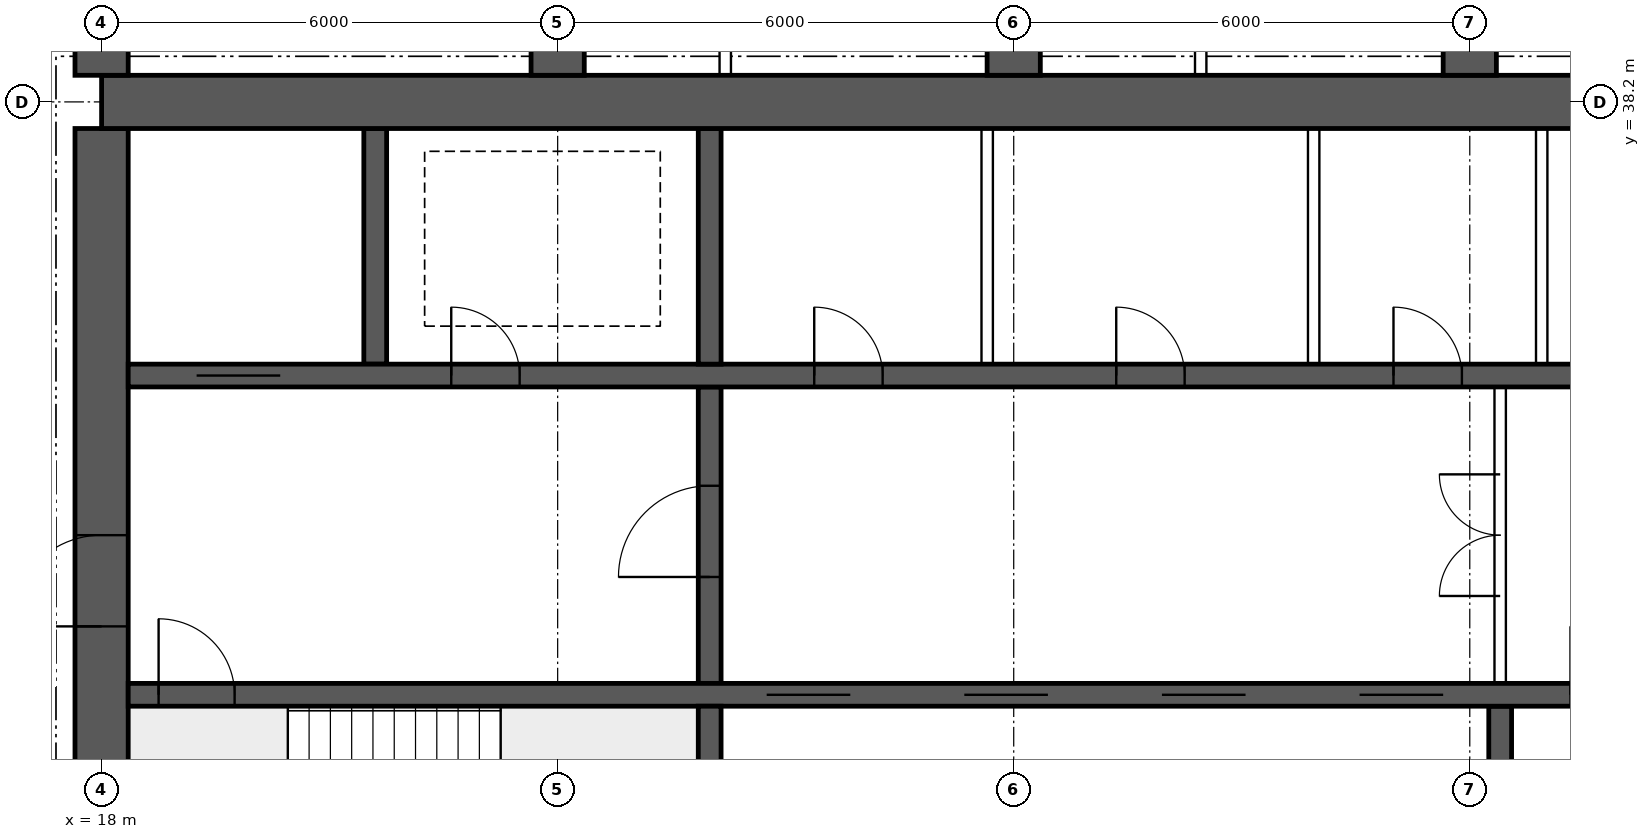
"""IFC4 building model, lengths in metres.
Left out: names, types, materials, properties, quantities, classifications, styles, units other than length and angle.
Written with IfcOpenShell. Run it as: python <this file> out.ifc"""

import sys

from ifc_helpers import new_model, si_unit, direction, frame, frame_2d, origin, place, context, subcontext, project, spatial, rectangle, extrude, element, fill, save


model = new_model("IFC4")
c1 = context("Model", 3, precision=1e-05, world=origin(), true_north=direction((0.0, 1.0)))
c2 = subcontext(c1, "Body", "Model", "MODEL_VIEW")
j1 = project(units=[si_unit("LENGTHUNIT", "METRE"), si_unit("PLANEANGLEUNIT", "RADIAN")], contexts=[c1])
p1 = place(None, origin())
s1 = spatial("IfcSite", under=j1, at=p1, CompositionType="ELEMENT")
p2 = place(p1, origin())
s2 = spatial("IfcBuilding", under=s1, at=p2, CompositionType="ELEMENT")
p3 = place(p2, frame((0.0, 0.0, 212.8)))
s3 = spatial("IfcBuildingStorey", under=s2, at=p3, CompositionType="ELEMENT", Elevation=212.8)
p4 = place(p3, frame((18.0, 38.2, 0.0), z_axis=(0.0, 0.0, 1.0), x_axis=(1.0, 0.0, 0.0)))
e1 = element("IfcWall", 1, at=p4, inside=s3, PredefinedType="SHEAR", context=c2, shape_type="SweptSolid", body=[
    extrude(rectangle(XDim=48.0, YDim=0.7, at=frame_2d((24.0, 0.0))), origin(), (0.0, 0.0, 1.0), 3.75),
])
p5 = place(p3, frame((18.0, 26.15, 0.0), z_axis=(0.0, 0.0, 1.0), x_axis=(0.0, 1.0, 0.0)))
e2 = element("IfcWall", 2, at=p5, inside=s3, PredefinedType="SHEAR", context=c2, shape_type="SweptSolid", body=[
    extrude(rectangle(XDim=11.7, YDim=0.7, at=frame_2d((5.85, 0.0))), origin(), (0.0, 0.0, 1.0), 3.75),
])
p6 = place(p5, frame((5.15, 0.0, 0.0)))
e3 = element("IfcOpeningElement", 3, at=p6, cuts=e2, PredefinedType="OPENING", context=c2, shape_type="SweptSolid", body=[
    extrude(rectangle(XDim=1.2, YDim=2.1, at=frame_2d((0.6, 1.05))), frame((0.0, 0.36, 0.0), z_axis=(0.0, -1.0, 0.0), x_axis=(1.0, 0.0, 0.0)), (0.0, 0.0, 1.0), 0.72),
])
p7 = place(p3, frame((18.35, 30.4, 0.0), z_axis=(0.0, 0.0, 1.0), x_axis=(1.0, 0.0, 0.0)))
e4 = element("IfcWall", 4, at=p7, inside=s3, PredefinedType="SHEAR", context=c2, shape_type="SweptSolid", body=[
    extrude(rectangle(XDim=47.3, YDim=0.3, at=frame_2d((23.65, 0.0))), origin(), (0.0, 0.0, 1.0), 3.75),
])
p8 = place(p7, frame((0.4, 0.0, 0.0)))
e5 = element("IfcOpeningElement", 5, at=p8, cuts=e4, PredefinedType="OPENING", context=c2, shape_type="SweptSolid", body=[
    extrude(rectangle(XDim=1.0, YDim=2.1, at=frame_2d((0.5, 1.05))), frame((0.0, 0.16, 0.0), z_axis=(0.0, -1.0, 0.0), x_axis=(1.0, 0.0, 0.0)), (0.0, 0.0, 1.0), 0.32),
])
p9 = place(p7, frame((45.9, 0.0, 0.0)))
e6 = element("IfcOpeningElement", 6, at=p9, cuts=e4, PredefinedType="OPENING", context=c2, shape_type="SweptSolid", body=[
    extrude(rectangle(XDim=1.0, YDim=2.1, at=frame_2d((0.5, 1.05))), frame((0.0, 0.16, 0.0), z_axis=(0.0, -1.0, 0.0), x_axis=(1.0, 0.0, 0.0)), (0.0, 0.0, 1.0), 0.32),
])
p10 = place(p7, frame((8.4, 0.0, 0.0)))
e7 = element("IfcOpeningElement", 7, at=p10, cuts=e4, PredefinedType="OPENING", context=c2, shape_type="SweptSolid", body=[
    extrude(rectangle(XDim=1.1, YDim=2.1, at=frame_2d((0.55, 1.05))), frame((0.0, 0.16, 0.0), z_axis=(0.0, -1.0, 0.0), x_axis=(1.0, 0.0, 0.0)), (0.0, 0.0, 1.0), 0.32),
])
p11 = place(p7, frame((11.0, 0.0, 0.0)))
e8 = element("IfcOpeningElement", 8, at=p11, cuts=e4, PredefinedType="OPENING", context=c2, shape_type="SweptSolid", body=[
    extrude(rectangle(XDim=1.1, YDim=2.1, at=frame_2d((0.55, 1.05))), frame((0.0, 0.16, 0.0), z_axis=(0.0, -1.0, 0.0), x_axis=(1.0, 0.0, 0.0)), (0.0, 0.0, 1.0), 0.32),
])
p12 = place(p7, frame((13.6, 0.0, 0.0)))
e9 = element("IfcOpeningElement", 9, at=p12, cuts=e4, PredefinedType="OPENING", context=c2, shape_type="SweptSolid", body=[
    extrude(rectangle(XDim=1.1, YDim=2.1, at=frame_2d((0.55, 1.05))), frame((0.0, 0.16, 0.0), z_axis=(0.0, -1.0, 0.0), x_axis=(1.0, 0.0, 0.0)), (0.0, 0.0, 1.0), 0.32),
])
p13 = place(p7, frame((16.2, 0.0, 0.0)))
e10 = element("IfcOpeningElement", 10, at=p13, cuts=e4, PredefinedType="OPENING", context=c2, shape_type="SweptSolid", body=[
    extrude(rectangle(XDim=1.1, YDim=2.1, at=frame_2d((0.55, 1.05))), frame((0.0, 0.16, 0.0), z_axis=(0.0, -1.0, 0.0), x_axis=(1.0, 0.0, 0.0)), (0.0, 0.0, 1.0), 0.32),
])
p14 = place(p7, frame((18.975, 0.0, 0.0)))
e11 = element("IfcOpeningElement", 11, at=p14, cuts=e4, PredefinedType="OPENING", context=c2, shape_type="SweptSolid", body=[
    extrude(rectangle(XDim=0.9, YDim=2.1, at=frame_2d((0.45, 1.05))), frame((0.0, 0.16, 0.0), z_axis=(0.0, -1.0, 0.0), x_axis=(1.0, 0.0, 0.0)), (0.0, 0.0, 1.0), 0.32),
])
p15 = place(p7, frame((30.267, 0.0, 0.0)))
e12 = element("IfcOpeningElement", 12, at=p15, cuts=e4, PredefinedType="OPENING", context=c2, shape_type="SweptSolid", body=[
    extrude(rectangle(XDim=1.1, YDim=2.1, at=frame_2d((0.55, 1.05))), frame((0.0, 0.16, 0.0), z_axis=(0.0, -1.0, 0.0), x_axis=(1.0, 0.0, 0.0)), (0.0, 0.0, 1.0), 0.32),
])
p16 = place(p7, frame((33.8, 0.0, 0.0)))
e13 = element("IfcOpeningElement", 13, at=p16, cuts=e4, PredefinedType="OPENING", context=c2, shape_type="SweptSolid", body=[
    extrude(rectangle(XDim=1.1, YDim=2.1, at=frame_2d((0.55, 1.05))), frame((0.0, 0.16, 0.0), z_axis=(0.0, -1.0, 0.0), x_axis=(1.0, 0.0, 0.0)), (0.0, 0.0, 1.0), 0.32),
])
p17 = place(p7, frame((37.333, 0.0, 0.0)))
e14 = element("IfcOpeningElement", 14, at=p17, cuts=e4, PredefinedType="OPENING", context=c2, shape_type="SweptSolid", body=[
    extrude(rectangle(XDim=1.1, YDim=2.1, at=frame_2d((0.55, 1.05))), frame((0.0, 0.16, 0.0), z_axis=(0.0, -1.0, 0.0), x_axis=(1.0, 0.0, 0.0)), (0.0, 0.0, 1.0), 0.32),
])
p18 = place(p3, frame((18.35, 34.6, 0.0), z_axis=(0.0, 0.0, 1.0), x_axis=(1.0, 0.0, 0.0)))
e15 = element("IfcWall", 15, at=p18, inside=s3, PredefinedType="SHEAR", context=c2, shape_type="SweptSolid", body=[
    extrude(rectangle(XDim=47.3, YDim=0.3, at=frame_2d((23.65, 0.0))), origin(), (0.0, 0.0, 1.0), 3.75),
])
p19 = place(p18, frame((0.9, 0.0, 0.0)))
e16 = element("IfcOpeningElement", 16, at=p19, cuts=e15, PredefinedType="OPENING", context=c2, shape_type="SweptSolid", body=[
    extrude(rectangle(XDim=1.1, YDim=2.1, at=frame_2d((0.55, 1.05))), frame((0.0, 0.16, 0.0), z_axis=(0.0, -1.0, 0.0), x_axis=(1.0, 0.0, 0.0)), (0.0, 0.0, 1.0), 0.32),
])
p20 = place(p18, frame((45.3, 0.0, 0.0)))
e17 = element("IfcOpeningElement", 17, at=p20, cuts=e15, PredefinedType="OPENING", context=c2, shape_type="SweptSolid", body=[
    extrude(rectangle(XDim=1.1, YDim=2.1, at=frame_2d((0.55, 1.05))), frame((0.0, 0.16, 0.0), z_axis=(0.0, -1.0, 0.0), x_axis=(1.0, 0.0, 0.0)), (0.0, 0.0, 1.0), 0.32),
])
p21 = place(p18, frame((4.25, 0.0, 0.0)))
e18 = element("IfcOpeningElement", 18, at=p21, cuts=e15, PredefinedType="OPENING", context=c2, shape_type="SweptSolid", body=[
    extrude(rectangle(XDim=0.9, YDim=2.1, at=frame_2d((0.45, 1.05))), frame((0.0, 0.16, 0.0), z_axis=(0.0, -1.0, 0.0), x_axis=(1.0, 0.0, 0.0)), (0.0, 0.0, 1.0), 0.32),
])
p22 = place(p18, frame((42.15, 0.0, 0.0)))
e19 = element("IfcOpeningElement", 19, at=p22, cuts=e15, PredefinedType="OPENING", context=c2, shape_type="SweptSolid", body=[
    extrude(rectangle(XDim=0.9, YDim=2.1, at=frame_2d((0.45, 1.05))), frame((0.0, 0.16, 0.0), z_axis=(0.0, -1.0, 0.0), x_axis=(1.0, 0.0, 0.0)), (0.0, 0.0, 1.0), 0.32),
])
p23 = place(p18, frame((9.025, 0.0, 0.0)))
e20 = element("IfcOpeningElement", 20, at=p23, cuts=e15, PredefinedType="OPENING", context=c2, shape_type="SweptSolid", body=[
    extrude(rectangle(XDim=0.9, YDim=2.1, at=frame_2d((0.45, 1.05))), frame((0.0, 0.16, 0.0), z_axis=(0.0, -1.0, 0.0), x_axis=(1.0, 0.0, 0.0)), (0.0, 0.0, 1.0), 0.32),
])
p24 = place(p18, frame((12.999, 0.0, 0.0)))
e21 = element("IfcOpeningElement", 21, at=p24, cuts=e15, PredefinedType="OPENING", context=c2, shape_type="SweptSolid", body=[
    extrude(rectangle(XDim=0.9, YDim=2.1, at=frame_2d((0.45, 1.05))), frame((0.0, 0.16, 0.0), z_axis=(0.0, -1.0, 0.0), x_axis=(1.0, 0.0, 0.0)), (0.0, 0.0, 1.0), 0.32),
])
p25 = place(p18, frame((16.646, 0.0, 0.0)))
e22 = element("IfcOpeningElement", 22, at=p25, cuts=e15, PredefinedType="OPENING", context=c2, shape_type="SweptSolid", body=[
    extrude(rectangle(XDim=0.9, YDim=2.1, at=frame_2d((0.45, 1.05))), frame((0.0, 0.16, 0.0), z_axis=(0.0, -1.0, 0.0), x_axis=(1.0, 0.0, 0.0)), (0.0, 0.0, 1.0), 0.32),
])
p26 = place(p18, frame((20.405, 0.0, 0.0)))
e23 = element("IfcOpeningElement", 23, at=p26, cuts=e15, PredefinedType="OPENING", context=c2, shape_type="SweptSolid", body=[
    extrude(rectangle(XDim=0.9, YDim=2.1, at=frame_2d((0.45, 1.05))), frame((0.0, 0.16, 0.0), z_axis=(0.0, -1.0, 0.0), x_axis=(1.0, 0.0, 0.0)), (0.0, 0.0, 1.0), 0.32),
])
p27 = place(p18, frame((24.811, 0.0, 0.0)))
e24 = element("IfcOpeningElement", 24, at=p27, cuts=e15, PredefinedType="OPENING", context=c2, shape_type="SweptSolid", body=[
    extrude(rectangle(XDim=0.9, YDim=2.1, at=frame_2d((0.45, 1.05))), frame((0.0, 0.16, 0.0), z_axis=(0.0, -1.0, 0.0), x_axis=(1.0, 0.0, 0.0)), (0.0, 0.0, 1.0), 0.32),
])
p28 = place(p18, frame((27.608, 0.0, 0.0)))
e25 = element("IfcOpeningElement", 25, at=p28, cuts=e15, PredefinedType="OPENING", context=c2, shape_type="SweptSolid", body=[
    extrude(rectangle(XDim=0.9, YDim=2.1, at=frame_2d((0.45, 1.05))), frame((0.0, 0.16, 0.0), z_axis=(0.0, -1.0, 0.0), x_axis=(1.0, 0.0, 0.0)), (0.0, 0.0, 1.0), 0.32),
])
p29 = place(p18, frame((29.981, 0.0, 0.0)))
e26 = element("IfcOpeningElement", 26, at=p29, cuts=e15, PredefinedType="OPENING", context=c2, shape_type="SweptSolid", body=[
    extrude(rectangle(XDim=0.9, YDim=2.1, at=frame_2d((0.45, 1.05))), frame((0.0, 0.16, 0.0), z_axis=(0.0, -1.0, 0.0), x_axis=(1.0, 0.0, 0.0)), (0.0, 0.0, 1.0), 0.32),
])
p30 = place(p18, frame((33.831, 0.0, 0.0)))
e27 = element("IfcOpeningElement", 27, at=p30, cuts=e15, PredefinedType="OPENING", context=c2, shape_type="SweptSolid", body=[
    extrude(rectangle(XDim=0.9, YDim=2.1, at=frame_2d((0.45, 1.05))), frame((0.0, 0.16, 0.0), z_axis=(0.0, -1.0, 0.0), x_axis=(1.0, 0.0, 0.0)), (0.0, 0.0, 1.0), 0.32),
])
p31 = place(p18, frame((37.579, 0.0, 0.0)))
e28 = element("IfcOpeningElement", 28, at=p31, cuts=e15, PredefinedType="OPENING", context=c2, shape_type="SweptSolid", body=[
    extrude(rectangle(XDim=0.9, YDim=2.1, at=frame_2d((0.45, 1.05))), frame((0.0, 0.16, 0.0), z_axis=(0.0, -1.0, 0.0), x_axis=(1.0, 0.0, 0.0)), (0.0, 0.0, 1.0), 0.32),
])
p32 = place(p3, frame((26.0, 26.15, 0.0), z_axis=(0.0, 0.0, 1.0), x_axis=(0.0, 1.0, 0.0)))
e29 = element("IfcWall", 29, at=p32, inside=s3, PredefinedType="SHEAR", context=c2, shape_type="SweptSolid", body=[
    extrude(rectangle(XDim=4.1, YDim=0.3, at=frame_2d((2.05, 0.0))), origin(), (0.0, 0.0, 1.0), 3.75),
])
p33 = place(p3, frame((26.0, 30.55, 0.0), z_axis=(0.0, 0.0, 1.0), x_axis=(0.0, 1.0, 0.0)))
e30 = element("IfcWall", 30, at=p33, inside=s3, PredefinedType="SHEAR", context=c2, shape_type="SweptSolid", body=[
    extrude(rectangle(XDim=3.9, YDim=0.3, at=frame_2d((1.95, 0.0))), origin(), (0.0, 0.0, 1.0), 3.75),
])
p34 = place(p33, frame((1.4, 0.0, 0.0)))
e31 = element("IfcOpeningElement", 31, at=p34, cuts=e30, PredefinedType="OPENING", context=c2, shape_type="SweptSolid", body=[
    extrude(rectangle(XDim=1.2, YDim=2.1, at=frame_2d((0.6, 1.05))), frame((0.0, 0.16, 0.0), z_axis=(0.0, -1.0, 0.0), x_axis=(1.0, 0.0, 0.0)), (0.0, 0.0, 1.0), 0.32),
])
for number, where, z_axis, x_axis in (
    (32, (21.6, 34.75, 0.0), (0.0, 0.0, 1.0), (0.0, 1.0, 0.0)),
    (33, (26.0, 34.75, 0.0), (0.0, 0.0, 1.0), (0.0, 1.0, 0.0)),
):
    element("IfcWall", number, at=place(p3, frame(where, z_axis=z_axis, x_axis=x_axis)), inside=s3, PredefinedType="SHEAR", context=c2, shape_type="SweptSolid", body=[
        extrude(rectangle(XDim=3.1, YDim=0.3, at=frame_2d((1.55, 0.0))), origin(), (0.0, 0.0, 1.0), 3.75),
    ])
p35 = place(p3, frame((36.4, 26.15, 0.0), z_axis=(0.0, 0.0, 1.0), x_axis=(0.0, 1.0, 0.0)))
e34 = element("IfcWall", 34, at=p35, inside=s3, PredefinedType="SHEAR", context=c2, shape_type="SweptSolid", body=[
    extrude(rectangle(XDim=4.1, YDim=0.3, at=frame_2d((2.05, 0.0))), origin(), (0.0, 0.0, 1.0), 3.75),
])
for number, where, z_axis, x_axis in (
    (35, (18.0, 38.55, 0.0), (0.0, 0.0, 1.0), (0.0, 1.0, 0.0)),
    (36, (24.0, 38.55, 0.0), (0.0, 0.0, 1.0), (0.0, 1.0, 0.0)),
    (37, (30.0, 38.55, 0.0), (0.0, 0.0, 1.0), (0.0, 1.0, 0.0)),
    (38, (36.0, 38.55, 0.0), (0.0, 0.0, 1.0), (0.0, 1.0, 0.0)),
):
    element("IfcWall", number, at=place(p3, frame(where, z_axis=z_axis, x_axis=x_axis)), inside=s3, PredefinedType="SHEAR", context=c2, shape_type="SweptSolid", body=[
        extrude(rectangle(XDim=7.05, YDim=0.7, at=frame_2d((3.525, 0.0))), origin(), (0.0, 0.0, 1.0), 3.75),
    ])
p36 = place(p3, frame((36.4, 30.55, 0.0), z_axis=(0.0, 0.0, 1.0), x_axis=(0.0, 1.0, 0.0)))
e39 = element("IfcWall", 39, at=p36, inside=s3, PredefinedType="SOLIDWALL", context=c2, shape_type="SweptSolid", body=[
    extrude(rectangle(XDim=3.9, YDim=0.15, at=frame_2d((1.95, 0.0))), origin(), (0.0, 0.0, 1.0), 3.3),
])
p37 = place(p36, frame((1.15, 0.0, 0.0)))
e40 = element("IfcOpeningElement", 40, at=p37, cuts=e39, PredefinedType="OPENING", context=c2, shape_type="SweptSolid", body=[
    extrude(rectangle(XDim=1.6, YDim=2.1, at=frame_2d((0.8, 1.05))), frame((0.0, 0.085, 0.0), z_axis=(0.0, -1.0, 0.0), x_axis=(1.0, 0.0, 0.0)), (0.0, 0.0, 1.0), 0.17),
])
for number, where, z_axis, x_axis in (
    (41, (29.651, 34.75, 0.0), (0.0, 0.0, 1.0), (0.0, 1.0, 0.0)),
    (42, (33.946, 34.75, 0.0), (0.0, 0.0, 1.0), (0.0, 1.0, 0.0)),
    (43, (36.946, 34.75, 0.0), (0.0, 0.0, 1.0), (0.0, 1.0, 0.0)),
):
    element("IfcWall", number, at=place(p3, frame(where, z_axis=z_axis, x_axis=x_axis)), inside=s3, PredefinedType="SOLIDWALL", context=c2, shape_type="SweptSolid", body=[
        extrude(rectangle(XDim=3.1, YDim=0.15, at=frame_2d((1.55, 0.0))), origin(), (0.0, 0.0, 1.0), 3.3),
    ])
for number, where, z_axis, x_axis in (
    (44, (26.205, 38.55, 0.0), (0.0, 0.0, 1.0), (0.0, 1.0, 0.0)),
    (45, (32.46, 38.55, 0.0), (0.0, 0.0, 1.0), (0.0, 1.0, 0.0)),
):
    element("IfcWall", number, at=place(p3, frame(where, z_axis=z_axis, x_axis=x_axis)), inside=s3, PredefinedType="PARTITIONING", context=c2, shape_type="SweptSolid", body=[
        extrude(rectangle(XDim=6.95, YDim=0.15, at=frame_2d((3.475, 0.0))), origin(), (0.0, 0.0, 1.0), 3.3),
    ])
p38 = place(p37, origin())
e46 = element("IfcDoor", 46, at=p38, inside=s3, OperationType="DOUBLE_DOOR_SINGLE_SWING", PredefinedType="DOOR", context=c2, shape_type="SweptSolid", body=[
    extrude(rectangle(XDim=1.6, YDim=2.1, at=frame_2d((0.8, 1.05))), frame((0.0, 0.025, 0.0), z_axis=(0.0, -1.0, 0.0), x_axis=(1.0, 0.0, 0.0)), (0.0, 0.0, 1.0), 0.05),
])
fill(e40, e46)
p39 = place(p6, origin())
e47 = element("IfcDoor", 47, at=p39, inside=s3, OperationType="SINGLE_SWING_LEFT", PredefinedType="DOOR", context=c2, shape_type="SweptSolid", body=[
    extrude(rectangle(XDim=1.2, YDim=2.1, at=frame_2d((0.6, 1.05))), frame((0.0, 0.025, 0.0), z_axis=(0.0, -1.0, 0.0), x_axis=(1.0, 0.0, 0.0)), (0.0, 0.0, 1.0), 0.05),
])
fill(e3, e47)
p40 = place(p8, origin())
e48 = element("IfcDoor", 48, at=p40, inside=s3, OperationType="SINGLE_SWING_LEFT", PredefinedType="DOOR", context=c2, shape_type="SweptSolid", body=[
    extrude(rectangle(XDim=1.0, YDim=2.1, at=frame_2d((0.5, 1.05))), frame((0.0, 0.025, 0.0), z_axis=(0.0, -1.0, 0.0), x_axis=(1.0, 0.0, 0.0)), (0.0, 0.0, 1.0), 0.05),
])
fill(e5, e48)
p41 = place(p19, origin())
e49 = element("IfcDoor", 49, at=p41, inside=s3, OperationType="DOUBLE_DOOR_SLIDING", PredefinedType="DOOR", context=c2, shape_type="SweptSolid", body=[
    extrude(rectangle(XDim=1.1, YDim=2.1, at=frame_2d((0.55, 1.05))), frame((0.0, 0.025, 0.0), z_axis=(0.0, -1.0, 0.0), x_axis=(1.0, 0.0, 0.0)), (0.0, 0.0, 1.0), 0.05),
])
fill(e16, e49)
p42 = place(p21, origin())
e50 = element("IfcDoor", 50, at=p42, inside=s3, OperationType="SINGLE_SWING_LEFT", PredefinedType="DOOR", context=c2, shape_type="SweptSolid", body=[
    extrude(rectangle(XDim=0.9, YDim=2.1, at=frame_2d((0.45, 1.05))), frame((0.0, 0.025, 0.0), z_axis=(0.0, -1.0, 0.0), x_axis=(1.0, 0.0, 0.0)), (0.0, 0.0, 1.0), 0.05),
])
fill(e18, e50)
p43 = place(p34, origin())
e51 = element("IfcDoor", 51, at=p43, inside=s3, OperationType="SINGLE_SWING_LEFT", PredefinedType="DOOR", context=c2, shape_type="SweptSolid", body=[
    extrude(rectangle(XDim=1.2, YDim=2.1, at=frame_2d((0.6, 1.05))), frame((0.0, 0.025, 0.0), z_axis=(0.0, -1.0, 0.0), x_axis=(1.0, 0.0, 0.0)), (0.0, 0.0, 1.0), 0.05),
])
fill(e31, e51)
p44 = place(p23, origin())
e52 = element("IfcDoor", 52, at=p44, inside=s3, OperationType="SINGLE_SWING_LEFT", PredefinedType="DOOR", context=c2, shape_type="SweptSolid", body=[
    extrude(rectangle(XDim=0.9, YDim=2.1, at=frame_2d((0.45, 1.05))), frame((0.0, 0.025, 0.0), z_axis=(0.0, -1.0, 0.0), x_axis=(1.0, 0.0, 0.0)), (0.0, 0.0, 1.0), 0.05),
])
fill(e20, e52)
p45 = place(p24, origin())
e53 = element("IfcDoor", 53, at=p45, inside=s3, OperationType="SINGLE_SWING_LEFT", PredefinedType="DOOR", context=c2, shape_type="SweptSolid", body=[
    extrude(rectangle(XDim=0.9, YDim=2.1, at=frame_2d((0.45, 1.05))), frame((0.0, 0.025, 0.0), z_axis=(0.0, -1.0, 0.0), x_axis=(1.0, 0.0, 0.0)), (0.0, 0.0, 1.0), 0.05),
])
fill(e21, e53)
p46 = place(p25, origin())
e54 = element("IfcDoor", 54, at=p46, inside=s3, OperationType="SINGLE_SWING_LEFT", PredefinedType="DOOR", context=c2, shape_type="SweptSolid", body=[
    extrude(rectangle(XDim=0.9, YDim=2.1, at=frame_2d((0.45, 1.05))), frame((0.0, 0.025, 0.0), z_axis=(0.0, -1.0, 0.0), x_axis=(1.0, 0.0, 0.0)), (0.0, 0.0, 1.0), 0.05),
])
fill(e22, e54)
p47 = place(p10, origin())
e55 = element("IfcDoor", 55, at=p47, inside=s3, OperationType="DOUBLE_DOOR_SLIDING", PredefinedType="DOOR", context=c2, shape_type="SweptSolid", body=[
    extrude(rectangle(XDim=1.1, YDim=2.1, at=frame_2d((0.55, 1.05))), frame((0.0, 0.025, 0.0), z_axis=(0.0, -1.0, 0.0), x_axis=(1.0, 0.0, 0.0)), (0.0, 0.0, 1.0), 0.05),
])
fill(e7, e55)
p48 = place(p11, origin())
e56 = element("IfcDoor", 56, at=p48, inside=s3, OperationType="DOUBLE_DOOR_SLIDING", PredefinedType="DOOR", context=c2, shape_type="SweptSolid", body=[
    extrude(rectangle(XDim=1.1, YDim=2.1, at=frame_2d((0.55, 1.05))), frame((0.0, 0.025, 0.0), z_axis=(0.0, -1.0, 0.0), x_axis=(1.0, 0.0, 0.0)), (0.0, 0.0, 1.0), 0.05),
])
fill(e8, e56)
p49 = place(p12, origin())
e57 = element("IfcDoor", 57, at=p49, inside=s3, OperationType="DOUBLE_DOOR_SLIDING", PredefinedType="DOOR", context=c2, shape_type="SweptSolid", body=[
    extrude(rectangle(XDim=1.1, YDim=2.1, at=frame_2d((0.55, 1.05))), frame((0.0, 0.025, 0.0), z_axis=(0.0, -1.0, 0.0), x_axis=(1.0, 0.0, 0.0)), (0.0, 0.0, 1.0), 0.05),
])
fill(e9, e57)
p50 = place(p13, origin())
e58 = element("IfcDoor", 58, at=p50, inside=s3, OperationType="DOUBLE_DOOR_SLIDING", PredefinedType="DOOR", context=c2, shape_type="SweptSolid", body=[
    extrude(rectangle(XDim=1.1, YDim=2.1, at=frame_2d((0.55, 1.05))), frame((0.0, 0.025, 0.0), z_axis=(0.0, -1.0, 0.0), x_axis=(1.0, 0.0, 0.0)), (0.0, 0.0, 1.0), 0.05),
])
fill(e10, e58)
save(model, sys.argv[1])
